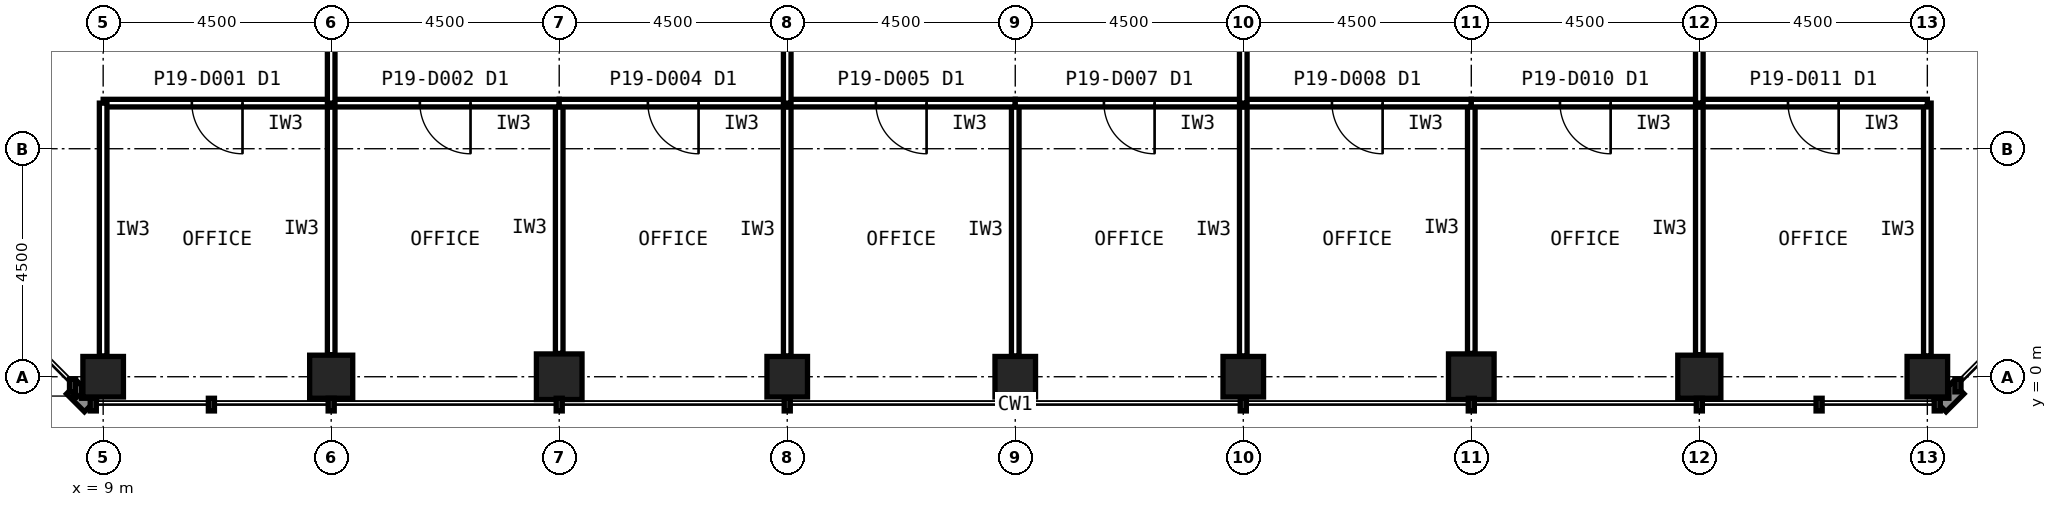
"""IFC4 building model, lengths in metres.
Left out: names, types, materials, properties, quantities, classifications, styles, units other than length and angle.
Written with IfcOpenShell. Run it as: python <this file> out.ifc"""

import sys

from ifc_helpers import new_model, si_unit, direction, frame, frame_2d, origin, origin_2d, place, context, subcontext, project, spatial, rectangle, hollow_rectangle, extrude, element, fill, save


model = new_model("IFC4")
c1 = context("Model", 3, precision=1e-05, world=origin(), true_north=direction((0.0, 1.0)))
c2 = subcontext(c1, "Body", "Model", "MODEL_VIEW")
j1 = project(units=[si_unit("LENGTHUNIT", "METRE"), si_unit("PLANEANGLEUNIT", "RADIAN")], contexts=[c1])
p1 = place(None, origin())
s1 = spatial("IfcSite", under=j1, at=p1, CompositionType="ELEMENT")
p2 = place(p1, origin())
s2 = spatial("IfcBuilding", under=s1, at=p2, CompositionType="ELEMENT")
p3 = place(p2, frame((0.0, 0.0, 79.4)))
s3 = spatial("IfcBuildingStorey", under=s2, at=p3, CompositionType="ELEMENT", Elevation=79.4)
p4 = place(p3, frame((9.0, 0.0, 0.0), z_axis=(0.0, 0.0, 1.0), x_axis=(1.0, 0.0, 0.0)))
e1 = element("IfcColumn", 1, at=p4, inside=s3, PredefinedType="COLUMN", context=c2, shape_type="SweptSolid", body=[
    extrude(hollow_rectangle(XDim=0.8, YDim=0.8, WallThickness=0.045, at=origin_2d()), origin(), (0.0, 0.0, 1.0), 4.2),
])
p5 = place(p3, frame((13.5, 0.0, 0.0), z_axis=(0.0, 0.0, 1.0), x_axis=(1.0, 0.0, 0.0)))
e2 = element("IfcColumn", 2, at=p5, inside=s3, PredefinedType="COLUMN", context=c2, shape_type="SweptSolid", body=[
    extrude(hollow_rectangle(XDim=0.85, YDim=0.85, WallThickness=0.05, at=origin_2d()), origin(), (0.0, 0.0, 1.0), 4.2),
])
p6 = place(p3, frame((18.0, 0.0, 0.0), z_axis=(0.0, 0.0, 1.0), x_axis=(1.0, 0.0, 0.0)))
e3 = element("IfcColumn", 3, at=p6, inside=s3, PredefinedType="COLUMN", context=c2, shape_type="SweptSolid", body=[
    extrude(hollow_rectangle(XDim=0.9, YDim=0.9, WallThickness=0.063, at=origin_2d()), origin(), (0.0, 0.0, 1.0), 4.2),
])
for number, where, z_axis, x_axis in (
    (4, (22.5, 0.0, 0.0), (0.0, 0.0, 1.0), (1.0, 0.0, 0.0)),
    (5, (27.0, 0.0, 0.0), (0.0, 0.0, 1.0), (1.0, 0.0, 0.0)),
    (6, (31.5, 0.0, 0.0), (0.0, 0.0, 1.0), (1.0, 0.0, 0.0)),
):
    element("IfcColumn", number, at=place(p3, frame(where, z_axis=z_axis, x_axis=x_axis)), inside=s3, PredefinedType="COLUMN", context=c2, shape_type="SweptSolid", body=[
        extrude(hollow_rectangle(XDim=0.8, YDim=0.8, WallThickness=0.045, at=origin_2d()), origin(), (0.0, 0.0, 1.0), 4.2),
    ])
p7 = place(p3, frame((36.0, 0.0, 0.0), z_axis=(0.0, 0.0, 1.0), x_axis=(1.0, 0.0, 0.0)))
e7 = element("IfcColumn", 7, at=p7, inside=s3, PredefinedType="COLUMN", context=c2, shape_type="SweptSolid", body=[
    extrude(hollow_rectangle(XDim=0.9, YDim=0.9, WallThickness=0.063, at=origin_2d()), origin(), (0.0, 0.0, 1.0), 4.2),
])
p8 = place(p3, frame((40.5, 0.0, 0.0), z_axis=(0.0, 0.0, 1.0), x_axis=(1.0, 0.0, 0.0)))
e8 = element("IfcColumn", 8, at=p8, inside=s3, PredefinedType="COLUMN", context=c2, shape_type="SweptSolid", body=[
    extrude(hollow_rectangle(XDim=0.85, YDim=0.85, WallThickness=0.05, at=origin_2d()), origin(), (0.0, 0.0, 1.0), 4.2),
])
p9 = place(p3, frame((45.0, 0.0, 0.0), z_axis=(0.0, 0.0, 1.0), x_axis=(1.0, 0.0, 0.0)))
e9 = element("IfcColumn", 9, at=p9, inside=s3, PredefinedType="COLUMN", context=c2, shape_type="SweptSolid", body=[
    extrude(hollow_rectangle(XDim=0.8, YDim=0.8, WallThickness=0.045, at=origin_2d()), origin(), (0.0, 0.0, 1.0), 4.2),
])
p10 = place(p3, frame((13.5, 0.435, 0.0), z_axis=(0.0, 0.0, 1.0), x_axis=(0.0, 1.0, 0.0)))
e10 = element("IfcWall", 10, at=p10, inside=s3, PredefinedType="PARTITIONING", context=c2, shape_type="SweptSolid", body=[
    extrude(rectangle(XDim=4.965, YDim=0.15, at=frame_2d((2.482, 0.0))), origin(), (0.0, 0.0, 1.0), 3.189),
])
p11 = place(p3, frame((13.5, 5.4, 0.0), z_axis=(0.0, 0.0, 1.0), x_axis=(-1.0, 0.0, 0.0)))
e11 = element("IfcWall", 11, at=p11, inside=s3, PredefinedType="PARTITIONING", context=c2, shape_type="SweptSolid", body=[
    extrude(rectangle(XDim=4.5, YDim=0.15, at=frame_2d((2.25, 0.0))), origin(), (0.0, 0.0, 1.0), 4.04),
])
p12 = place(p11, frame((1.75, 0.0, 0.0)))
e12 = element("IfcOpeningElement", 12, at=p12, cuts=e11, PredefinedType="OPENING", context=c2, shape_type="SweptSolid", body=[
    extrude(rectangle(XDim=1.0, YDim=2.1, at=frame_2d((0.5, 1.05))), frame((0.0, 0.085, 0.0), z_axis=(0.0, -1.0, 0.0), x_axis=(1.0, 0.0, 0.0)), (0.0, 0.0, 1.0), 0.17),
])
p13 = place(p3, frame((9.0, 5.4, 0.0), z_axis=(0.0, 0.0, 1.0), x_axis=(0.0, -1.0, 0.0)))
e13 = element("IfcWall", 13, at=p13, inside=s3, PredefinedType="PARTITIONING", context=c2, shape_type="SweptSolid", body=[
    extrude(rectangle(XDim=4.99, YDim=0.15, at=frame_2d((2.495, 0.0))), origin(), (0.0, 0.0, 1.0), 3.429),
])
p14 = place(p3, frame((18.0, 0.46, 0.0), z_axis=(0.0, 0.0, 1.0), x_axis=(0.0, 1.0, 0.0)))
e14 = element("IfcWall", 14, at=p14, inside=s3, PredefinedType="PARTITIONING", context=c2, shape_type="SweptSolid", body=[
    extrude(rectangle(XDim=4.94, YDim=0.15, at=frame_2d((2.47, 0.0))), origin(), (0.0, 0.0, 1.0), 3.189),
])
p15 = place(p3, frame((18.0, 5.4, 0.0), z_axis=(0.0, 0.0, 1.0), x_axis=(-1.0, 0.0, 0.0)))
e15 = element("IfcWall", 15, at=p15, inside=s3, PredefinedType="PARTITIONING", context=c2, shape_type="SweptSolid", body=[
    extrude(rectangle(XDim=4.5, YDim=0.15, at=frame_2d((2.25, 0.0))), origin(), (0.0, 0.0, 1.0), 4.04),
])
p16 = place(p15, frame((1.75, 0.0, 0.0)))
e16 = element("IfcOpeningElement", 16, at=p16, cuts=e15, PredefinedType="OPENING", context=c2, shape_type="SweptSolid", body=[
    extrude(rectangle(XDim=1.0, YDim=2.1, at=frame_2d((0.5, 1.05))), frame((0.0, 0.085, 0.0), z_axis=(0.0, -1.0, 0.0), x_axis=(1.0, 0.0, 0.0)), (0.0, 0.0, 1.0), 0.17),
])
p17 = place(p3, frame((22.5, 0.41, 0.0), z_axis=(0.0, 0.0, 1.0), x_axis=(0.0, 1.0, 0.0)))
e17 = element("IfcWall", 17, at=p17, inside=s3, PredefinedType="PARTITIONING", context=c2, shape_type="SweptSolid", body=[
    extrude(rectangle(XDim=4.99, YDim=0.15, at=frame_2d((2.495, 0.0))), origin(), (0.0, 0.0, 1.0), 3.189),
])
p18 = place(p3, frame((22.5, 5.4, 0.0), z_axis=(0.0, 0.0, 1.0), x_axis=(-1.0, 0.0, 0.0)))
e18 = element("IfcWall", 18, at=p18, inside=s3, PredefinedType="PARTITIONING", context=c2, shape_type="SweptSolid", body=[
    extrude(rectangle(XDim=4.5, YDim=0.15, at=frame_2d((2.25, 0.0))), origin(), (0.0, 0.0, 1.0), 4.04),
])
p19 = place(p18, frame((1.75, 0.0, 0.0)))
e19 = element("IfcOpeningElement", 19, at=p19, cuts=e18, PredefinedType="OPENING", context=c2, shape_type="SweptSolid", body=[
    extrude(rectangle(XDim=1.0, YDim=2.1, at=frame_2d((0.5, 1.05))), frame((0.0, 0.085, 0.0), z_axis=(0.0, -1.0, 0.0), x_axis=(1.0, 0.0, 0.0)), (0.0, 0.0, 1.0), 0.17),
])
p20 = place(p3, frame((27.0, 0.41, 0.0), z_axis=(0.0, 0.0, 1.0), x_axis=(0.0, 1.0, 0.0)))
e20 = element("IfcWall", 20, at=p20, inside=s3, PredefinedType="PARTITIONING", context=c2, shape_type="SweptSolid", body=[
    extrude(rectangle(XDim=4.99, YDim=0.15, at=frame_2d((2.495, 0.0))), origin(), (0.0, 0.0, 1.0), 3.189),
])
p21 = place(p3, frame((27.0, 5.4, 0.0), z_axis=(0.0, 0.0, 1.0), x_axis=(-1.0, 0.0, 0.0)))
e21 = element("IfcWall", 21, at=p21, inside=s3, PredefinedType="PARTITIONING", context=c2, shape_type="SweptSolid", body=[
    extrude(rectangle(XDim=4.5, YDim=0.15, at=frame_2d((2.25, 0.0))), origin(), (0.0, 0.0, 1.0), 4.04),
])
p22 = place(p21, frame((1.75, 0.0, 0.0)))
e22 = element("IfcOpeningElement", 22, at=p22, cuts=e21, PredefinedType="OPENING", context=c2, shape_type="SweptSolid", body=[
    extrude(rectangle(XDim=1.0, YDim=2.1, at=frame_2d((0.5, 1.05))), frame((0.0, 0.085, 0.0), z_axis=(0.0, -1.0, 0.0), x_axis=(1.0, 0.0, 0.0)), (0.0, 0.0, 1.0), 0.17),
])
p23 = place(p3, frame((31.5, 0.41, 0.0), z_axis=(0.0, 0.0, 1.0), x_axis=(0.0, 1.0, 0.0)))
e23 = element("IfcWall", 23, at=p23, inside=s3, PredefinedType="PARTITIONING", context=c2, shape_type="SweptSolid", body=[
    extrude(rectangle(XDim=4.99, YDim=0.15, at=frame_2d((2.495, 0.0))), origin(), (0.0, 0.0, 1.0), 3.189),
])
p24 = place(p3, frame((31.5, 5.4, 0.0), z_axis=(0.0, 0.0, 1.0), x_axis=(-1.0, 0.0, 0.0)))
e24 = element("IfcWall", 24, at=p24, inside=s3, PredefinedType="PARTITIONING", context=c2, shape_type="SweptSolid", body=[
    extrude(rectangle(XDim=4.5, YDim=0.15, at=frame_2d((2.25, 0.0))), origin(), (0.0, 0.0, 1.0), 4.04),
])
p25 = place(p24, frame((1.75, 0.0, 0.0)))
e25 = element("IfcOpeningElement", 25, at=p25, cuts=e24, PredefinedType="OPENING", context=c2, shape_type="SweptSolid", body=[
    extrude(rectangle(XDim=1.0, YDim=2.1, at=frame_2d((0.5, 1.05))), frame((0.0, 0.085, 0.0), z_axis=(0.0, -1.0, 0.0), x_axis=(1.0, 0.0, 0.0)), (0.0, 0.0, 1.0), 0.17),
])
p26 = place(p3, frame((36.0, 0.46, 0.0), z_axis=(0.0, 0.0, 1.0), x_axis=(0.0, 1.0, 0.0)))
e26 = element("IfcWall", 26, at=p26, inside=s3, PredefinedType="PARTITIONING", context=c2, shape_type="SweptSolid", body=[
    extrude(rectangle(XDim=4.94, YDim=0.15, at=frame_2d((2.47, 0.0))), origin(), (0.0, 0.0, 1.0), 3.189),
])
p27 = place(p3, frame((36.0, 5.4, 0.0), z_axis=(0.0, 0.0, 1.0), x_axis=(-1.0, 0.0, 0.0)))
e27 = element("IfcWall", 27, at=p27, inside=s3, PredefinedType="PARTITIONING", context=c2, shape_type="SweptSolid", body=[
    extrude(rectangle(XDim=4.5, YDim=0.15, at=frame_2d((2.25, 0.0))), origin(), (0.0, 0.0, 1.0), 4.04),
])
p28 = place(p27, frame((1.75, 0.0, 0.0)))
e28 = element("IfcOpeningElement", 28, at=p28, cuts=e27, PredefinedType="OPENING", context=c2, shape_type="SweptSolid", body=[
    extrude(rectangle(XDim=1.0, YDim=2.1, at=frame_2d((0.5, 1.05))), frame((0.0, 0.085, 0.0), z_axis=(0.0, -1.0, 0.0), x_axis=(1.0, 0.0, 0.0)), (0.0, 0.0, 1.0), 0.17),
])
p29 = place(p3, frame((40.5, 0.435, 0.0), z_axis=(0.0, 0.0, 1.0), x_axis=(0.0, 1.0, 0.0)))
e29 = element("IfcWall", 29, at=p29, inside=s3, PredefinedType="PARTITIONING", context=c2, shape_type="SweptSolid", body=[
    extrude(rectangle(XDim=4.965, YDim=0.15, at=frame_2d((2.482, 0.0))), origin(), (0.0, 0.0, 1.0), 3.189),
])
p30 = place(p3, frame((40.5, 5.4, 0.0), z_axis=(0.0, 0.0, 1.0), x_axis=(-1.0, 0.0, 0.0)))
e30 = element("IfcWall", 30, at=p30, inside=s3, PredefinedType="PARTITIONING", context=c2, shape_type="SweptSolid", body=[
    extrude(rectangle(XDim=4.5, YDim=0.15, at=frame_2d((2.25, 0.0))), origin(), (0.0, 0.0, 1.0), 4.04),
])
p31 = place(p30, frame((1.75, 0.0, 0.0)))
e31 = element("IfcOpeningElement", 31, at=p31, cuts=e30, PredefinedType="OPENING", context=c2, shape_type="SweptSolid", body=[
    extrude(rectangle(XDim=1.0, YDim=2.1, at=frame_2d((0.5, 1.05))), frame((0.0, 0.085, 0.0), z_axis=(0.0, -1.0, 0.0), x_axis=(1.0, 0.0, 0.0)), (0.0, 0.0, 1.0), 0.17),
])
p32 = place(p3, frame((45.0, 0.41, 0.0), z_axis=(0.0, 0.0, 1.0), x_axis=(0.0, 1.0, 0.0)))
e32 = element("IfcWall", 32, at=p32, inside=s3, PredefinedType="PARTITIONING", context=c2, shape_type="SweptSolid", body=[
    extrude(rectangle(XDim=4.99, YDim=0.15, at=frame_2d((2.495, 0.0))), origin(), (0.0, 0.0, 1.0), 3.429),
])
p33 = place(p3, frame((45.0, 5.4, 0.0), z_axis=(0.0, 0.0, 1.0), x_axis=(-1.0, 0.0, 0.0)))
e33 = element("IfcWall", 33, at=p33, inside=s3, PredefinedType="PARTITIONING", context=c2, shape_type="SweptSolid", body=[
    extrude(rectangle(XDim=4.5, YDim=0.15, at=frame_2d((2.25, 0.0))), origin(), (0.0, 0.0, 1.0), 4.04),
])
p34 = place(p33, frame((1.75, 0.0, 0.0)))
e34 = element("IfcOpeningElement", 34, at=p34, cuts=e33, PredefinedType="OPENING", context=c2, shape_type="SweptSolid", body=[
    extrude(rectangle(XDim=1.0, YDim=2.1, at=frame_2d((0.5, 1.05))), frame((0.0, 0.085, 0.0), z_axis=(0.0, -1.0, 0.0), x_axis=(1.0, 0.0, 0.0)), (0.0, 0.0, 1.0), 0.17),
])
p35 = place(p3, frame((40.5, 5.4, 0.0), z_axis=(0.0, 0.0, 1.0), x_axis=(0.0, 1.0, 0.0)))
e35 = element("IfcWall", 35, at=p35, inside=s3, PredefinedType="PARTITIONING", context=c2, shape_type="SweptSolid", body=[
    extrude(rectangle(XDim=8.1, YDim=0.15, at=frame_2d((4.05, 0.0))), origin(), (0.0, 0.0, 1.0), 3.189),
])
p36 = place(p35, frame((3.55, 0.0, 0.0)))
e36 = element("IfcOpeningElement", 36, at=p36, cuts=e35, PredefinedType="OPENING", context=c2, shape_type="SweptSolid", body=[
    extrude(rectangle(XDim=1.0, YDim=2.1, at=frame_2d((0.5, 1.05))), frame((0.0, 0.085, 0.0), z_axis=(0.0, -1.0, 0.0), x_axis=(1.0, 0.0, 0.0)), (0.0, 0.0, 1.0), 0.17),
])
p37 = place(p3, frame((13.5, 5.4, 0.0), z_axis=(0.0, 0.0, 1.0), x_axis=(0.0, 1.0, 0.0)))
e37 = element("IfcWall", 37, at=p37, inside=s3, PredefinedType="PARTITIONING", context=c2, shape_type="SweptSolid", body=[
    extrude(rectangle(XDim=8.1, YDim=0.15, at=frame_2d((4.05, 0.0))), origin(), (0.0, 0.0, 1.0), 3.189),
])
p38 = place(p37, frame((3.55, 0.0, 0.0)))
e38 = element("IfcOpeningElement", 38, at=p38, cuts=e37, PredefinedType="OPENING", context=c2, shape_type="SweptSolid", body=[
    extrude(rectangle(XDim=1.0, YDim=2.1, at=frame_2d((0.5, 1.05))), frame((0.0, 0.085, 0.0), z_axis=(0.0, -1.0, 0.0), x_axis=(1.0, 0.0, 0.0)), (0.0, 0.0, 1.0), 0.17),
])
p39 = place(p3, frame((22.5, 13.5, 0.0), z_axis=(0.0, 0.0, 1.0), x_axis=(0.0, -1.0, 0.0)))
e39 = element("IfcWall", 39, at=p39, inside=s3, PredefinedType="PARTITIONING", context=c2, shape_type="SweptSolid", body=[
    extrude(rectangle(XDim=8.1, YDim=0.15, at=frame_2d((4.05, 0.0))), origin(), (0.0, 0.0, 1.0), 3.189),
])
p40 = place(p39, frame((3.55, 0.0, 0.0)))
e40 = element("IfcOpeningElement", 40, at=p40, cuts=e39, PredefinedType="OPENING", context=c2, shape_type="SweptSolid", body=[
    extrude(rectangle(XDim=1.0, YDim=2.1, at=frame_2d((0.5, 1.05))), frame((0.0, 0.085, 0.0), z_axis=(0.0, -1.0, 0.0), x_axis=(1.0, 0.0, 0.0)), (0.0, 0.0, 1.0), 0.17),
])
p41 = place(p3, frame((31.5, 13.5, 0.0), z_axis=(0.0, 0.0, 1.0), x_axis=(0.0, -1.0, 0.0)))
e41 = element("IfcWall", 41, at=p41, inside=s3, PredefinedType="PARTITIONING", context=c2, shape_type="SweptSolid", body=[
    extrude(rectangle(XDim=8.1, YDim=0.15, at=frame_2d((4.05, 0.0))), origin(), (0.0, 0.0, 1.0), 3.189),
])
p42 = place(p41, frame((3.55, 0.0, 0.0)))
e42 = element("IfcOpeningElement", 42, at=p42, cuts=e41, PredefinedType="OPENING", context=c2, shape_type="SweptSolid", body=[
    extrude(rectangle(XDim=1.0, YDim=2.1, at=frame_2d((0.5, 1.05))), frame((0.0, 0.085, 0.0), z_axis=(0.0, -1.0, 0.0), x_axis=(1.0, 0.0, 0.0)), (0.0, 0.0, 1.0), 0.17),
])
p43 = place(p12, origin())
e43 = element("IfcDoor", 43, at=p43, inside=s3, OperationType="SINGLE_SWING_LEFT", PredefinedType="DOOR", context=c2, shape_type="SweptSolid", body=[
    extrude(rectangle(XDim=1.0, YDim=2.1, at=frame_2d((0.5, 1.05))), frame((0.0, 0.025, 0.0), z_axis=(0.0, -1.0, 0.0), x_axis=(1.0, 0.0, 0.0)), (0.0, 0.0, 1.0), 0.05),
])
fill(e12, e43)
p44 = place(p16, origin())
e44 = element("IfcDoor", 44, at=p44, inside=s3, OperationType="SINGLE_SWING_LEFT", PredefinedType="DOOR", context=c2, shape_type="SweptSolid", body=[
    extrude(rectangle(XDim=1.0, YDim=2.1, at=frame_2d((0.5, 1.05))), frame((0.0, 0.025, 0.0), z_axis=(0.0, -1.0, 0.0), x_axis=(1.0, 0.0, 0.0)), (0.0, 0.0, 1.0), 0.05),
])
fill(e16, e44)
p45 = place(p19, origin())
e45 = element("IfcDoor", 45, at=p45, inside=s3, OperationType="SINGLE_SWING_LEFT", PredefinedType="DOOR", context=c2, shape_type="SweptSolid", body=[
    extrude(rectangle(XDim=1.0, YDim=2.1, at=frame_2d((0.5, 1.05))), frame((0.0, 0.025, 0.0), z_axis=(0.0, -1.0, 0.0), x_axis=(1.0, 0.0, 0.0)), (0.0, 0.0, 1.0), 0.05),
])
fill(e19, e45)
p46 = place(p22, origin())
e46 = element("IfcDoor", 46, at=p46, inside=s3, OperationType="SINGLE_SWING_LEFT", PredefinedType="DOOR", context=c2, shape_type="SweptSolid", body=[
    extrude(rectangle(XDim=1.0, YDim=2.1, at=frame_2d((0.5, 1.05))), frame((0.0, 0.025, 0.0), z_axis=(0.0, -1.0, 0.0), x_axis=(1.0, 0.0, 0.0)), (0.0, 0.0, 1.0), 0.05),
])
fill(e22, e46)
p47 = place(p25, origin())
e47 = element("IfcDoor", 47, at=p47, inside=s3, OperationType="SINGLE_SWING_LEFT", PredefinedType="DOOR", context=c2, shape_type="SweptSolid", body=[
    extrude(rectangle(XDim=1.0, YDim=2.1, at=frame_2d((0.5, 1.05))), frame((0.0, 0.025, 0.0), z_axis=(0.0, -1.0, 0.0), x_axis=(1.0, 0.0, 0.0)), (0.0, 0.0, 1.0), 0.05),
])
fill(e25, e47)
p48 = place(p28, origin())
e48 = element("IfcDoor", 48, at=p48, inside=s3, OperationType="SINGLE_SWING_LEFT", PredefinedType="DOOR", context=c2, shape_type="SweptSolid", body=[
    extrude(rectangle(XDim=1.0, YDim=2.1, at=frame_2d((0.5, 1.05))), frame((0.0, 0.025, 0.0), z_axis=(0.0, -1.0, 0.0), x_axis=(1.0, 0.0, 0.0)), (0.0, 0.0, 1.0), 0.05),
])
fill(e28, e48)
p49 = place(p31, origin())
e49 = element("IfcDoor", 49, at=p49, inside=s3, OperationType="SINGLE_SWING_LEFT", PredefinedType="DOOR", context=c2, shape_type="SweptSolid", body=[
    extrude(rectangle(XDim=1.0, YDim=2.1, at=frame_2d((0.5, 1.05))), frame((0.0, 0.025, 0.0), z_axis=(0.0, -1.0, 0.0), x_axis=(1.0, 0.0, 0.0)), (0.0, 0.0, 1.0), 0.05),
])
fill(e31, e49)
p50 = place(p34, origin())
e50 = element("IfcDoor", 50, at=p50, inside=s3, OperationType="SINGLE_SWING_LEFT", PredefinedType="DOOR", context=c2, shape_type="SweptSolid", body=[
    extrude(rectangle(XDim=1.0, YDim=2.1, at=frame_2d((0.5, 1.05))), frame((0.0, 0.025, 0.0), z_axis=(0.0, -1.0, 0.0), x_axis=(1.0, 0.0, 0.0)), (0.0, 0.0, 1.0), 0.05),
])
fill(e34, e50)
save(model, sys.argv[1])
